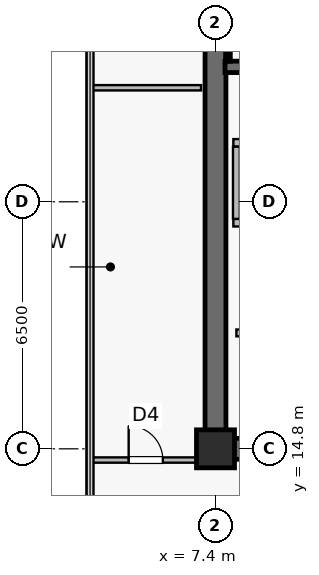
"""IFC4 building model, lengths in metres.
Left out: names, types, materials, properties, quantities, classifications, styles, units other than length and angle.
Written with IfcOpenShell. Run it as: python <this file> out.ifc"""

import sys

from ifc_helpers import new_model, si_unit, direction, frame, frame_2d, origin, origin_2d, place, context, subcontext, project, spatial, rectangle, extrude, source, transform, mapped, element, fill, save


model = new_model("IFC4")
c1 = context("Model", 3, precision=1e-05, world=origin(), true_north=direction((0.0, 1.0)))
c2 = subcontext(c1, "Body", "Model", "MODEL_VIEW")
j1 = project(units=[si_unit("LENGTHUNIT", "METRE"), si_unit("PLANEANGLEUNIT", "RADIAN")], contexts=[c1])
p1 = place(None, origin())
s1 = spatial("IfcSite", under=j1, at=p1, CompositionType="ELEMENT")
p2 = place(p1, origin())
s2 = spatial("IfcBuilding", under=s1, at=p2, CompositionType="ELEMENT")
p3 = place(p2, frame((0.0, 0.0, 267.0)))
s3 = spatial("IfcBuildingStorey", under=s2, at=p3, CompositionType="ELEMENT", Elevation=267.0)
p4 = place(p3, frame((7.125, 14.8, 0.0), z_axis=(0.0, 0.0, 1.0), x_axis=(1.0, 0.0, 0.0)))
e1 = element("IfcWall", 1, at=p4, inside=s3, PredefinedType="SHEAR", context=c2, shape_type="SweptSolid", body=[
    extrude(rectangle(XDim=15.35, YDim=0.55, at=frame_2d((7.675, 0.0))), origin(), (0.0, 0.0, 1.0), 3.8),
])
p5 = place(p3, frame((7.4, 15.075, 0.0), z_axis=(0.0, 0.0, 1.0), x_axis=(0.0, 1.0, 0.0)))
e2 = element("IfcWall", 2, at=p5, inside=s3, PredefinedType="SHEAR", context=c2, shape_type="SweptSolid", body=[
    extrude(rectangle(XDim=18.45, YDim=0.55, at=frame_2d((9.225, 0.0))), origin(), (0.0, 0.0, 1.0), 3.8),
])
p6 = place(p3, frame((7.65, 24.85, 0.0), z_axis=(0.0, 0.0, 1.0), x_axis=(1.0, 0.0, 0.0)))
e3 = element("IfcWall", 3, at=p6, inside=s3, PredefinedType="SHEAR", context=c2, shape_type="SweptSolid", body=[
    extrude(rectangle(XDim=3.8, YDim=0.3, at=frame_2d((1.9, 0.0))), origin(), (0.0, 0.0, 1.0), 3.8),
])
p7 = place(p3, frame((7.73, 25.0, 0.0), z_axis=(0.0, 0.0, 1.0), x_axis=(0.0, 1.0, 0.0)))
e4 = element("IfcWall", 4, at=p7, inside=s3, PredefinedType="SOLIDWALL", context=c2, shape_type="SweptSolid", body=[
    extrude(rectangle(XDim=8.32, YDim=0.12, at=frame_2d((4.16, 0.0))), origin(), (0.0, 0.0, 1.0), 3.8),
])
m1 = source(origin(), c2, "Body", "SweptSolid", [
    extrude(rectangle(XDim=1.0, YDim=1.0, at=origin_2d()), origin(), (0.0, 0.0, 1.0), 4.1),
])
p8 = place(p3, frame((7.4, 14.8, 0.0), z_axis=(0.0, 0.0, 1.0), x_axis=(1.0, 0.0, 0.0)))
e5 = element("IfcColumn", 5, at=p8, inside=s3, PredefinedType="COLUMN", context=c2, shape_type="MappedRepresentation", body=[
    mapped(m1, transform((0.0, 0.0, 0.0), scale=1.0)),
])
p9 = place(p3, frame((7.87, 20.75, 0.0), z_axis=(0.0, 0.0, 1.0), x_axis=(1.0, 0.0, 0.0)))
e6 = element("IfcWall", 6, at=p9, inside=s3, PredefinedType="SOLIDWALL", context=c2, shape_type="SweptSolid", body=[
    extrude(rectangle(XDim=2.26, YDim=0.2, at=frame_2d((1.13, 0.0))), origin(), (0.0, 0.0, 1.0), 3.8),
])
p10 = place(p9, frame((0.58, 0.0, 0.0)))
e7 = element("IfcOpeningElement", 7, at=p10, cuts=e6, PredefinedType="OPENING", context=c2, shape_type="SweptSolid", body=[
    extrude(rectangle(XDim=1.1, YDim=2.22, at=frame_2d((0.55, 1.11))), frame((0.0, 0.11, 0.0), z_axis=(0.0, -1.0, 0.0), x_axis=(1.0, 0.0, 0.0)), (0.0, 0.0, 1.0), 0.22),
])
p11 = place(p3, frame((7.87, 22.85, 0.0), z_axis=(0.0, 0.0, 1.0), x_axis=(1.0, 0.0, 0.0)))
e8 = element("IfcWall", 8, at=p11, inside=s3, PredefinedType="SOLIDWALL", context=c2, shape_type="SweptSolid", body=[
    extrude(rectangle(XDim=2.26, YDim=0.2, at=frame_2d((1.13, 0.0))), origin(), (0.0, 0.0, 1.0), 3.8),
])
p12 = place(p3, frame((7.95, 20.85, 0.0), z_axis=(0.0, 0.0, 1.0), x_axis=(0.0, 1.0, 0.0)))
e9 = element("IfcWall", 9, at=p12, inside=s3, PredefinedType="SOLIDWALL", context=c2, shape_type="SweptSolid", body=[
    extrude(rectangle(XDim=1.9, YDim=0.18, at=frame_2d((0.95, 0.0))), origin(), (0.0, 0.0, 1.0), 3.8),
])
p13 = place(p3, frame((7.95, 17.85, 0.0), z_axis=(0.0, 0.0, 1.0), x_axis=(1.0, 0.0, 0.0)))
e10 = element("IfcWall", 10, at=p13, inside=s3, PredefinedType="SOLIDWALL", context=c2, shape_type="SweptSolid", body=[
    extrude(rectangle(XDim=10.3, YDim=0.18, at=frame_2d((5.15, 0.0))), origin(), (0.0, 0.0, 1.0), 3.197),
])
p14 = place(p13, frame((4.675, 0.0, 0.0)))
e11 = element("IfcOpeningElement", 11, at=p14, cuts=e10, PredefinedType="OPENING", context=c2, shape_type="SweptSolid", body=[
    extrude(rectangle(XDim=0.95, YDim=2.15, at=frame_2d((0.475, 1.075))), frame((0.0, 0.1, 0.0), z_axis=(0.0, -1.0, 0.0), x_axis=(1.0, 0.0, 0.0)), (0.0, 0.0, 1.0), 0.2),
])
p15 = place(p3, frame((4.11, 24.3, 0.0), z_axis=(0.0, 0.0, 1.0), x_axis=(1.0, 0.0, 0.0)))
e12 = element("IfcWall", 12, at=p15, inside=s3, PredefinedType="PARTITIONING", context=c2, shape_type="SweptSolid", body=[
    extrude(rectangle(XDim=2.91, YDim=0.14, at=frame_2d((1.455, 0.0))), origin(), (0.0, 0.0, 1.0), 3.8),
])
p16 = place(p3, frame((4.11, 14.505, 0.0), z_axis=(0.0, 0.0, 1.0), x_axis=(1.0, 0.0, 0.0)))
e13 = element("IfcWall", 13, at=p16, inside=s3, PredefinedType="PARTITIONING", context=c2, shape_type="SweptSolid", body=[
    extrude(rectangle(XDim=2.91, YDim=0.14, at=frame_2d((1.455, 0.0))), origin(), (0.0, 0.0, 1.0), 3.8),
])
p17 = place(p16, frame((1.005, 0.0, 0.0)))
e14 = element("IfcOpeningElement", 14, at=p17, cuts=e13, PredefinedType="OPENING", context=c2, shape_type="SweptSolid", body=[
    extrude(rectangle(XDim=0.9, YDim=2.1, at=frame_2d((0.45, 1.05))), frame((0.0, 0.08, 0.0), z_axis=(0.0, -1.0, 0.0), x_axis=(1.0, 0.0, 0.0)), (0.0, 0.0, 1.0), 0.16),
])
m2 = source(origin(), c2, "Body", "SweptSolid", [
    extrude(rectangle(XDim=0.9, YDim=2.1, at=frame_2d((0.45, 1.05))), frame((0.0, 0.025, 0.0), z_axis=(0.0, -1.0, 0.0), x_axis=(1.0, 0.0, 0.0)), (0.0, 0.0, 1.0), 0.05),
])
p18 = place(p17, origin())
e15 = element("IfcDoor", 15, at=p18, inside=s3, OperationType="SINGLE_SWING_LEFT", PredefinedType="DOOR", context=c2, shape_type="MappedRepresentation", body=[
    mapped(m2, transform((0.0, 0.0, 0.0), scale=1.0)),
])
fill(e14, e15)
save(model, sys.argv[1])
